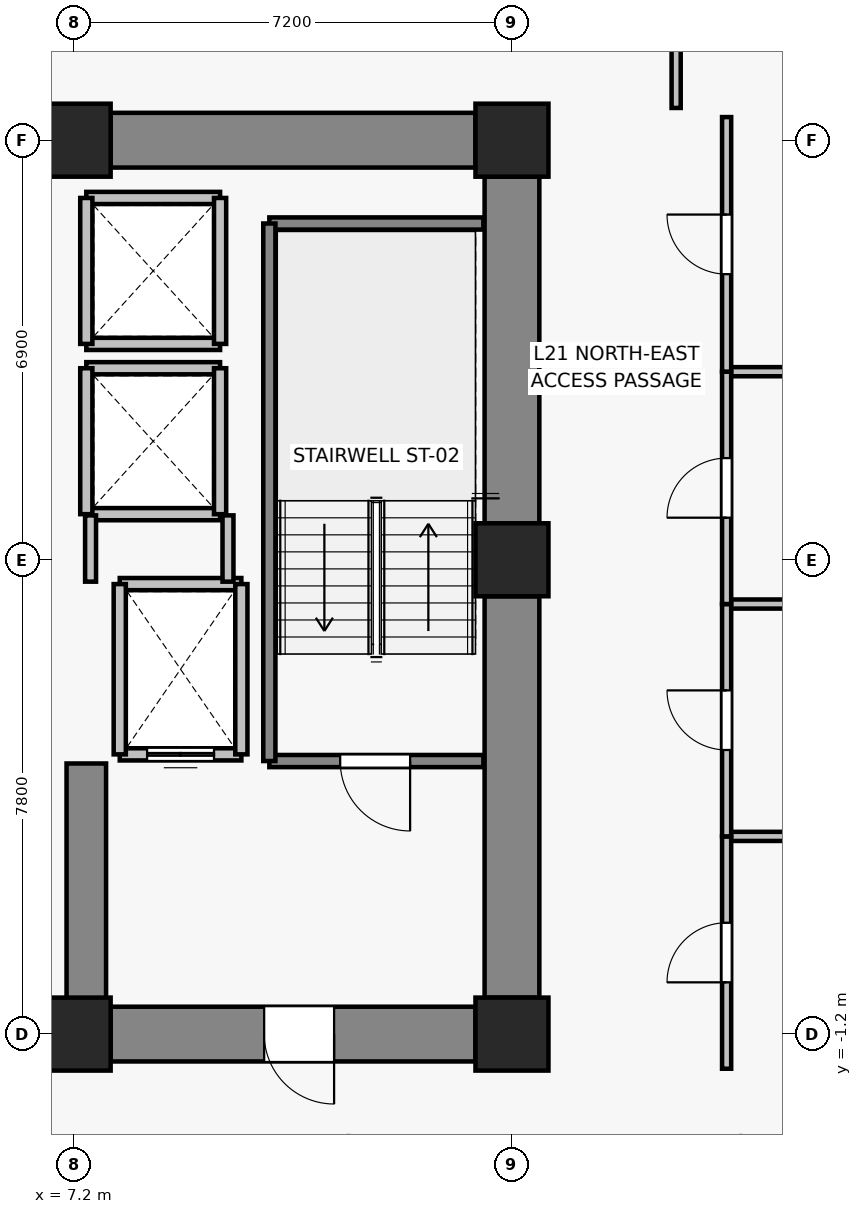
"""IFC4 building model, lengths in metres.
Left out: names, types, materials, properties, quantities, classifications, styles, units other than length and angle.
Written with IfcOpenShell. Run it as: python <this file> out.ifc"""

import sys

from ifc_helpers import new_model, si_unit, direction, frame, frame_2d, origin, origin_2d, place, context, subcontext, project, spatial, rectangle, extrude, source, transform, mapped, element, fill, save


model = new_model("IFC4")
c1 = context("Model", 3, precision=1e-05, world=origin(), true_north=direction((0.0, 1.0)))
c2 = subcontext(c1, "Body", "Model", "MODEL_VIEW")
j1 = project(units=[si_unit("LENGTHUNIT", "METRE"), si_unit("PLANEANGLEUNIT", "RADIAN")], contexts=[c1])
p1 = place(None, origin())
s1 = spatial("IfcSite", under=j1, at=p1, CompositionType="ELEMENT")
p2 = place(p1, origin())
s2 = spatial("IfcBuilding", under=s1, at=p2, CompositionType="ELEMENT")
p3 = place(p2, frame((0.0, 0.0, 76.9)))
s3 = spatial("IfcBuildingStorey", under=s2, at=p3, CompositionType="ELEMENT", Elevation=76.9)
for number, where, z_axis, x_axis in (
    (1, (7.2, -1.2, 0.0), (0.0, 0.0, 1.0), (1.0, 0.0, 0.0)),
    (2, (14.4, -1.2, 0.0), (0.0, 0.0, 1.0), (1.0, 0.0, 0.0)),
    (3, (14.4, 6.6, 0.0), (0.0, 0.0, 1.0), (1.0, 0.0, 0.0)),
    (4, (7.2, 13.5, 0.0), (0.0, 0.0, 1.0), (1.0, 0.0, 0.0)),
    (5, (14.4, 13.5, 0.0), (0.0, 0.0, 1.0), (1.0, 0.0, 0.0)),
):
    element("IfcColumn", number, at=place(p3, frame(where, z_axis=z_axis, x_axis=x_axis)), inside=s3, PredefinedType="COLUMN", context=c2, shape_type="SweptSolid", body=[
        extrude(rectangle(XDim=1.2, YDim=1.2, at=origin_2d()), origin(), (0.0, 0.0, 1.0), 3.3),
    ])
p4 = place(p3, frame((7.8, 13.5, 0.0), z_axis=(0.0, 0.0, 1.0), x_axis=(1.0, 0.0, 0.0)))
e6 = element("IfcWall", 6, at=p4, inside=s3, PredefinedType="SHEAR", context=c2, shape_type="SweptSolid", body=[
    extrude(rectangle(XDim=6.0, YDim=0.9, at=frame_2d((3.0, 0.0))), origin(), (0.0, 0.0, 1.0), 3.05),
])
p5 = place(p3, frame((14.4, -0.6, 0.0), z_axis=(0.0, 0.0, 1.0), x_axis=(0.0, 1.0, 0.0)))
e7 = element("IfcWall", 7, at=p5, inside=s3, PredefinedType="SHEAR", context=c2, shape_type="SweptSolid", body=[
    extrude(rectangle(XDim=6.6, YDim=0.9, at=frame_2d((3.3, 0.0))), origin(), (0.0, 0.0, 1.0), 3.05),
])
p6 = place(p3, frame((14.4, 7.2, 0.0), z_axis=(0.0, 0.0, 1.0), x_axis=(0.0, 1.0, 0.0)))
e8 = element("IfcWall", 8, at=p6, inside=s3, PredefinedType="SHEAR", context=c2, shape_type="SweptSolid", body=[
    extrude(rectangle(XDim=5.7, YDim=0.9, at=frame_2d((2.85, 0.0))), origin(), (0.0, 0.0, 1.0), 3.05),
])
p7 = place(p3, frame((13.8, -1.2, 0.0), z_axis=(0.0, 0.0, 1.0), x_axis=(-1.0, 0.0, 0.0)))
e9 = element("IfcWall", 9, at=p7, inside=s3, PredefinedType="SHEAR", context=c2, shape_type="SweptSolid", body=[
    extrude(rectangle(XDim=6.0, YDim=0.9, at=frame_2d((3.0, 0.0))), origin(), (0.0, 0.0, 1.0), 3.05),
])
p8 = place(p7, frame((2.325, 0.0, 0.0)))
e10 = element("IfcOpeningElement", 10, at=p8, cuts=e9, PredefinedType="OPENING", context=c2, shape_type="SweptSolid", body=[
    extrude(rectangle(XDim=1.15, YDim=2.15, at=frame_2d((0.575, 1.075))), frame((0.0, 0.46, 0.0), z_axis=(0.0, -1.0, 0.0), x_axis=(1.0, 0.0, 0.0)), (0.0, 0.0, 1.0), 0.92),
])
p9 = place(p3, frame((7.4, -0.75, 0.0), z_axis=(0.0, 0.0, 1.0), x_axis=(0.0, 1.0, 0.0)))
e11 = element("IfcWall", 11, at=p9, inside=s3, PredefinedType="SHEAR", context=c2, shape_type="SweptSolid", body=[
    extrude(rectangle(XDim=4.0, YDim=0.65, at=frame_2d((2.0, 0.0))), origin(), (0.0, 0.0, 1.0), 3.05),
])
p10 = place(p3, frame((9.95, 3.4, 0.0), z_axis=(0.0, 0.0, 1.0), x_axis=(-1.0, 0.0, 0.0)))
e12 = element("IfcWall", 12, at=p10, inside=s3, PredefinedType="SOLIDWALL", context=c2, shape_type="SweptSolid", body=[
    extrude(rectangle(XDim=2.0, YDim=0.2, at=frame_2d((1.0, 0.0))), origin(), (0.0, 0.0, 1.0), 3.05),
])
p11 = place(p10, frame((0.45, 0.0, 0.0)))
e13 = element("IfcOpeningElement", 13, at=p11, cuts=e12, PredefinedType="OPENING", context=c2, shape_type="SweptSolid", body=[
    extrude(rectangle(XDim=1.1, YDim=2.2, at=frame_2d((0.55, 1.1))), frame((0.0, 0.11, 0.0), z_axis=(0.0, -1.0, 0.0), x_axis=(1.0, 0.0, 0.0)), (0.0, 0.0, 1.0), 0.22),
])
p12 = place(p3, frame((7.95, 6.2, 0.0), z_axis=(0.0, 0.0, 1.0), x_axis=(1.0, 0.0, 0.0)))
e14 = element("IfcWall", 14, at=p12, inside=s3, PredefinedType="SOLIDWALL", context=c2, shape_type="SweptSolid", body=[
    extrude(rectangle(XDim=2.0, YDim=0.2, at=frame_2d((1.0, 0.0))), origin(), (0.0, 0.0, 1.0), 3.05),
])
for number, where, z_axis, x_axis in (
    (15, (7.95, 3.4, 0.0), (0.0, 0.0, 1.0), (0.0, 1.0, 0.0)),
    (16, (9.95, 6.2, 0.0), (0.0, 0.0, 1.0), (0.0, -1.0, 0.0)),
):
    element("IfcWall", number, at=place(p3, frame(where, z_axis=z_axis, x_axis=x_axis)), inside=s3, PredefinedType="SOLIDWALL", context=c2, shape_type="SweptSolid", body=[
        extrude(rectangle(XDim=2.8, YDim=0.2, at=frame_2d((1.4, 0.0))), origin(), (0.0, 0.0, 1.0), 3.05),
    ])
for number, where, z_axis, x_axis in (
    (17, (9.6, 7.35, 0.0), (0.0, 0.0, 1.0), (-1.0, 0.0, 0.0)),
    (18, (7.4, 9.75, 0.0), (0.0, 0.0, 1.0), (1.0, 0.0, 0.0)),
):
    element("IfcWall", number, at=place(p3, frame(where, z_axis=z_axis, x_axis=x_axis)), inside=s3, PredefinedType="SOLIDWALL", context=c2, shape_type="SweptSolid", body=[
        extrude(rectangle(XDim=2.2, YDim=0.2, at=frame_2d((1.1, 0.0))), origin(), (0.0, 0.0, 1.0), 2.44),
    ])
p13 = place(p3, frame((7.4, 7.35, 0.0), z_axis=(0.0, 0.0, 1.0), x_axis=(0.0, 1.0, 0.0)))
e19 = element("IfcWall", 19, at=p13, inside=s3, PredefinedType="SOLIDWALL", context=c2, shape_type="SweptSolid", body=[
    extrude(rectangle(XDim=2.4, YDim=0.2, at=frame_2d((1.2, 0.0))), origin(), (0.0, 0.0, 1.0), 2.44),
])
p14 = place(p3, frame((9.6, 9.75, 0.0), z_axis=(0.0, 0.0, 1.0), x_axis=(0.0, -1.0, 0.0)))
e20 = element("IfcWall", 20, at=p14, inside=s3, PredefinedType="SOLIDWALL", context=c2, shape_type="SweptSolid", body=[
    extrude(rectangle(XDim=2.4, YDim=0.2, at=frame_2d((1.2, 0.0))), origin(), (0.0, 0.0, 1.0), 3.05),
])
for number, where, z_axis, x_axis in (
    (21, (9.6, 10.15, 0.0), (0.0, 0.0, 1.0), (-1.0, 0.0, 0.0)),
    (22, (7.4, 12.55, 0.0), (0.0, 0.0, 1.0), (1.0, 0.0, 0.0)),
):
    element("IfcWall", number, at=place(p3, frame(where, z_axis=z_axis, x_axis=x_axis)), inside=s3, PredefinedType="SOLIDWALL", context=c2, shape_type="SweptSolid", body=[
        extrude(rectangle(XDim=2.2, YDim=0.2, at=frame_2d((1.1, 0.0))), origin(), (0.0, 0.0, 1.0), 2.44),
    ])
p15 = place(p3, frame((7.4, 10.15, 0.0), z_axis=(0.0, 0.0, 1.0), x_axis=(0.0, 1.0, 0.0)))
e23 = element("IfcWall", 23, at=p15, inside=s3, PredefinedType="SOLIDWALL", context=c2, shape_type="SweptSolid", body=[
    extrude(rectangle(XDim=2.4, YDim=0.2, at=frame_2d((1.2, 0.0))), origin(), (0.0, 0.0, 1.0), 2.44),
])
p16 = place(p3, frame((9.6, 12.55, 0.0), z_axis=(0.0, 0.0, 1.0), x_axis=(0.0, -1.0, 0.0)))
e24 = element("IfcWall", 24, at=p16, inside=s3, PredefinedType="SOLIDWALL", context=c2, shape_type="SweptSolid", body=[
    extrude(rectangle(XDim=2.4, YDim=0.2, at=frame_2d((1.2, 0.0))), origin(), (0.0, 0.0, 1.0), 3.05),
])
p17 = place(p3, frame((13.93, 3.29, 0.0), z_axis=(0.0, 0.0, 1.0), x_axis=(-1.0, 0.0, 0.0)))
e25 = element("IfcWall", 25, at=p17, inside=s3, PredefinedType="SOLIDWALL", context=c2, shape_type="SweptSolid", body=[
    extrude(rectangle(XDim=3.52, YDim=0.2, at=frame_2d((1.76, 0.0))), origin(), (0.0, 0.0, 1.0), 3.05),
])
p18 = place(p17, frame((1.205, 0.0, 0.0)))
e26 = element("IfcOpeningElement", 26, at=p18, cuts=e25, PredefinedType="OPENING", context=c2, shape_type="SweptSolid", body=[
    extrude(rectangle(XDim=1.15, YDim=2.15, at=frame_2d((0.575, 1.075))), frame((0.0, 0.11, 0.0), z_axis=(0.0, -1.0, 0.0), x_axis=(1.0, 0.0, 0.0)), (0.0, 0.0, 1.0), 0.22),
])
p19 = place(p3, frame((10.41, 12.13, 0.0), z_axis=(0.0, 0.0, 1.0), x_axis=(1.0, 0.0, 0.0)))
e27 = element("IfcWall", 27, at=p19, inside=s3, PredefinedType="SOLIDWALL", context=c2, shape_type="SweptSolid", body=[
    extrude(rectangle(XDim=3.52, YDim=0.2, at=frame_2d((1.76, 0.0))), origin(), (0.0, 0.0, 1.0), 3.05),
])
p20 = place(p3, frame((10.41, 3.29, 0.0), z_axis=(0.0, 0.0, 1.0), x_axis=(0.0, 1.0, 0.0)))
e28 = element("IfcWall", 28, at=p20, inside=s3, PredefinedType="SOLIDWALL", context=c2, shape_type="SweptSolid", body=[
    extrude(rectangle(XDim=8.84, YDim=0.2, at=frame_2d((4.42, 0.0))), origin(), (0.0, 0.0, 1.0), 3.05),
])
p21 = place(p3, frame((7.47, 6.24, 0.0), z_axis=(0.0, 0.0, 1.0), x_axis=(0.0, 1.0, 0.0)))
e29 = element("IfcWall", 29, at=p21, inside=s3, PredefinedType="PARTITIONING", context=c2, shape_type="SweptSolid", body=[
    extrude(rectangle(XDim=1.09, YDim=0.18, at=frame_2d((0.545, 0.0))), origin(), (0.0, 0.0, 1.0), 2.44),
])
p22 = place(p3, frame((9.73, 7.33, 0.0), z_axis=(0.0, 0.0, 1.0), x_axis=(0.0, -1.0, 0.0)))
e30 = element("IfcWall", 30, at=p22, inside=s3, PredefinedType="PARTITIONING", context=c2, shape_type="SweptSolid", body=[
    extrude(rectangle(XDim=1.09, YDim=0.18, at=frame_2d((0.545, 0.0))), origin(), (0.0, 0.0, 1.0), 3.05),
])
p23 = place(p3, frame((17.93, 2.051, 0.0), z_axis=(0.0, 0.0, 1.0), x_axis=(1.0, 0.0, 0.0)))
e31 = element("IfcWall", 31, at=p23, inside=s3, PredefinedType="PARTITIONING", context=c2, shape_type="SweptSolid", body=[
    extrude(rectangle(XDim=14.6, YDim=0.15, at=frame_2d((7.3, 0.0))), origin(), (0.0, 0.0, 1.0), 2.44),
])
p24 = place(p3, frame((17.93, -1.77, 0.0), z_axis=(0.0, 0.0, 1.0), x_axis=(0.0, 1.0, 0.0)))
e32 = element("IfcWall", 32, at=p24, inside=s3, PredefinedType="PARTITIONING", context=c2, shape_type="SweptSolid", body=[
    extrude(rectangle(XDim=3.821, YDim=0.15, at=frame_2d((1.911, 0.0))), origin(), (0.0, 0.0, 1.0), 2.44),
])
p25 = place(p24, frame((1.421, 0.0, 0.0)))
e33 = element("IfcOpeningElement", 33, at=p25, cuts=e32, PredefinedType="OPENING", context=c2, shape_type="SweptSolid", body=[
    extrude(rectangle(XDim=0.98, YDim=2.15, at=frame_2d((0.49, 1.075))), frame((0.0, 0.085, 0.0), z_axis=(0.0, -1.0, 0.0), x_axis=(1.0, 0.0, 0.0)), (0.0, 0.0, 1.0), 0.17),
])
p26 = place(p3, frame((17.93, 5.872, 0.0), z_axis=(0.0, 0.0, 1.0), x_axis=(1.0, 0.0, 0.0)))
e34 = element("IfcWall", 34, at=p26, inside=s3, PredefinedType="PARTITIONING", context=c2, shape_type="SweptSolid", body=[
    extrude(rectangle(XDim=14.6, YDim=0.15, at=frame_2d((7.3, 0.0))), origin(), (0.0, 0.0, 1.0), 2.44),
])
p27 = place(p3, frame((17.93, 2.051, 0.0), z_axis=(0.0, 0.0, 1.0), x_axis=(0.0, 1.0, 0.0)))
e35 = element("IfcWall", 35, at=p27, inside=s3, PredefinedType="PARTITIONING", context=c2, shape_type="SweptSolid", body=[
    extrude(rectangle(XDim=3.821, YDim=0.15, at=frame_2d((1.911, 0.0))), origin(), (0.0, 0.0, 1.0), 3.05),
])
p28 = place(p27, frame((1.421, 0.0, 0.0)))
e36 = element("IfcOpeningElement", 36, at=p28, cuts=e35, PredefinedType="OPENING", context=c2, shape_type="SweptSolid", body=[
    extrude(rectangle(XDim=0.98, YDim=2.15, at=frame_2d((0.49, 1.075))), frame((0.0, 0.085, 0.0), z_axis=(0.0, -1.0, 0.0), x_axis=(1.0, 0.0, 0.0)), (0.0, 0.0, 1.0), 0.17),
])
p29 = place(p3, frame((17.93, 9.693, 0.0), z_axis=(0.0, 0.0, 1.0), x_axis=(1.0, 0.0, 0.0)))
e37 = element("IfcWall", 37, at=p29, inside=s3, PredefinedType="PARTITIONING", context=c2, shape_type="SweptSolid", body=[
    extrude(rectangle(XDim=14.6, YDim=0.15, at=frame_2d((7.3, 0.0))), origin(), (0.0, 0.0, 1.0), 2.44),
])
p30 = place(p3, frame((17.93, 5.872, 0.0), z_axis=(0.0, 0.0, 1.0), x_axis=(0.0, 1.0, 0.0)))
e38 = element("IfcWall", 38, at=p30, inside=s3, PredefinedType="PARTITIONING", context=c2, shape_type="SweptSolid", body=[
    extrude(rectangle(XDim=3.821, YDim=0.15, at=frame_2d((1.911, 0.0))), origin(), (0.0, 0.0, 1.0), 2.44),
])
p31 = place(p30, frame((1.42, 0.0, 0.0)))
e39 = element("IfcOpeningElement", 39, at=p31, cuts=e38, PredefinedType="OPENING", context=c2, shape_type="SweptSolid", body=[
    extrude(rectangle(XDim=0.98, YDim=2.15, at=frame_2d((0.49, 1.075))), frame((0.0, 0.085, 0.0), z_axis=(0.0, -1.0, 0.0), x_axis=(1.0, 0.0, 0.0)), (0.0, 0.0, 1.0), 0.17),
])
p32 = place(p3, frame((17.93, 9.693, 0.0), z_axis=(0.0, 0.0, 1.0), x_axis=(0.0, 1.0, 0.0)))
e40 = element("IfcWall", 40, at=p32, inside=s3, PredefinedType="PARTITIONING", context=c2, shape_type="SweptSolid", body=[
    extrude(rectangle(XDim=4.187, YDim=0.15, at=frame_2d((2.093, 0.0))), origin(), (0.0, 0.0, 1.0), 2.44),
])
p33 = place(p32, frame((1.604, 0.0, 0.0)))
e41 = element("IfcOpeningElement", 41, at=p33, cuts=e40, PredefinedType="OPENING", context=c2, shape_type="SweptSolid", body=[
    extrude(rectangle(XDim=0.98, YDim=2.15, at=frame_2d((0.49, 1.075))), frame((0.0, 0.085, 0.0), z_axis=(0.0, -1.0, 0.0), x_axis=(1.0, 0.0, 0.0)), (0.0, 0.0, 1.0), 0.17),
])
p34 = place(p3, frame((17.1, 18.13, 0.0), z_axis=(0.0, 0.0, 1.0), x_axis=(0.0, -1.0, 0.0)))
e42 = element("IfcWall", 42, at=p34, inside=s3, PredefinedType="PARTITIONING", context=c2, shape_type="SweptSolid", body=[
    extrude(rectangle(XDim=4.1, YDim=0.15, at=frame_2d((2.05, 0.0))), origin(), (0.0, 0.0, 1.0), 2.44),
])
m1 = source(origin(), c2, "Body", "SweptSolid", [
    extrude(rectangle(XDim=1.1, YDim=2.2, at=frame_2d((0.55, 1.1))), frame((0.0, 0.025, 0.0), z_axis=(0.0, -1.0, 0.0), x_axis=(1.0, 0.0, 0.0)), (0.0, 0.0, 1.0), 0.05),
])
p35 = place(p11, origin())
e43 = element("IfcDoor", 43, at=p35, inside=s3, OperationType="DOUBLE_DOOR_SLIDING", PredefinedType="DOOR", context=c2, shape_type="MappedRepresentation", body=[
    mapped(m1, transform((0.0, 0.0, 0.0), x_axis=(1.0, 0.0, 0.0), y_axis=(0.0, 1.0, 0.0), z_axis=(0.0, 0.0, 1.0), scale=1.0)),
])
fill(e13, e43)
m2 = source(origin(), c2, "Body", "SweptSolid", [
    extrude(rectangle(XDim=1.15, YDim=2.15, at=frame_2d((0.575, 1.075))), frame((0.0, 0.025, 0.0), z_axis=(0.0, -1.0, 0.0), x_axis=(1.0, 0.0, 0.0)), (0.0, 0.0, 1.0), 0.05),
])
p36 = place(p18, origin())
e44 = element("IfcDoor", 44, at=p36, inside=s3, OperationType="SINGLE_SWING_LEFT", PredefinedType="DOOR", context=c2, shape_type="MappedRepresentation", body=[
    mapped(m2, transform((0.0, 0.0, 0.0), x_axis=(1.0, 0.0, 0.0), y_axis=(0.0, 1.0, 0.0), z_axis=(0.0, 0.0, 1.0), scale=1.0)),
])
fill(e26, e44)
p37 = place(p8, origin())
e45 = element("IfcDoor", 45, at=p37, inside=s3, OperationType="SINGLE_SWING_LEFT", PredefinedType="DOOR", context=c2, shape_type="MappedRepresentation", body=[
    mapped(m2, transform((0.0, 0.0, 0.0), x_axis=(1.0, 0.0, 0.0), y_axis=(0.0, 1.0, 0.0), z_axis=(0.0, 0.0, 1.0), scale=1.0)),
])
fill(e10, e45)
m3 = source(origin(), c2, "Body", "SweptSolid", [
    extrude(rectangle(XDim=0.98, YDim=2.15, at=frame_2d((0.49, 1.075))), frame((0.0, 0.025, 0.0), z_axis=(0.0, -1.0, 0.0), x_axis=(1.0, 0.0, 0.0)), (0.0, 0.0, 1.0), 0.05),
])
p38 = place(p25, origin())
e46 = element("IfcDoor", 46, at=p38, inside=s3, OperationType="SINGLE_SWING_LEFT", PredefinedType="DOOR", context=c2, shape_type="MappedRepresentation", body=[
    mapped(m3, transform((0.0, 0.0, 0.0), x_axis=(1.0, 0.0, 0.0), y_axis=(0.0, 1.0, 0.0), z_axis=(0.0, 0.0, 1.0), scale=1.0)),
])
fill(e33, e46)
p39 = place(p28, origin())
e47 = element("IfcDoor", 47, at=p39, inside=s3, OperationType="SINGLE_SWING_RIGHT", PredefinedType="DOOR", context=c2, shape_type="MappedRepresentation", body=[
    mapped(m3, transform((0.0, 0.0, 0.0), x_axis=(1.0, 0.0, 0.0), y_axis=(0.0, 1.0, 0.0), z_axis=(0.0, 0.0, 1.0), scale=1.0)),
])
fill(e36, e47)
p40 = place(p31, origin())
e48 = element("IfcDoor", 48, at=p40, inside=s3, OperationType="SINGLE_SWING_LEFT", PredefinedType="DOOR", context=c2, shape_type="MappedRepresentation", body=[
    mapped(m3, transform((0.0, 0.0, 0.0), x_axis=(1.0, 0.0, 0.0), y_axis=(0.0, 1.0, 0.0), z_axis=(0.0, 0.0, 1.0), scale=1.0)),
])
fill(e39, e48)
p41 = place(p33, origin())
e49 = element("IfcDoor", 49, at=p41, inside=s3, OperationType="SINGLE_SWING_RIGHT", PredefinedType="DOOR", context=c2, shape_type="MappedRepresentation", body=[
    mapped(m3, transform((0.0, 0.0, 0.0), x_axis=(1.0, 0.0, 0.0), y_axis=(0.0, 1.0, 0.0), z_axis=(0.0, 0.0, 1.0), scale=1.0)),
])
fill(e41, e49)
save(model, sys.argv[1])
